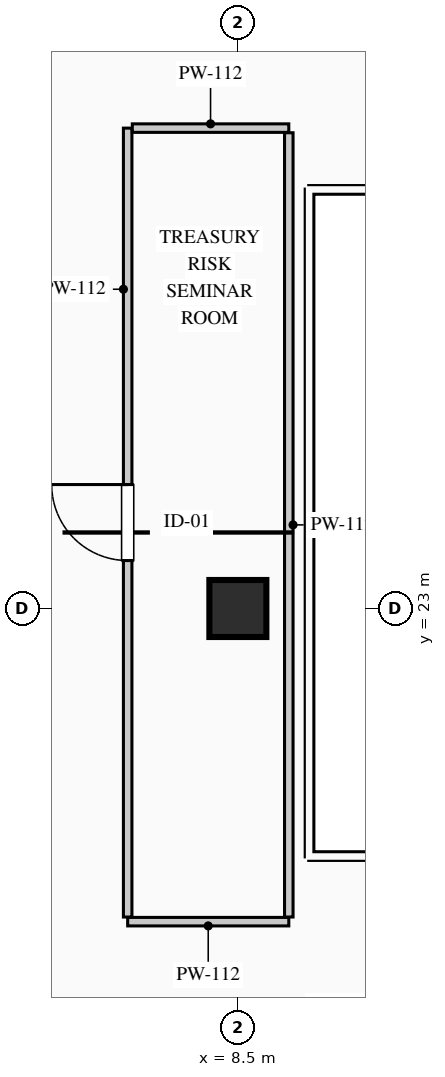
"""IFC4 building model, lengths in metres.
Left out: names, types, materials, properties, quantities, classifications, styles, units other than length and angle.
Written with IfcOpenShell. Run it as: python <this file> out.ifc"""

import sys

from ifc_helpers import new_model, si_unit, direction, frame, frame_2d, origin, origin_2d, place, context, subcontext, project, spatial, rectangle, extrude, element, fill, save


model = new_model("IFC4")
c1 = context("Model", 3, precision=1e-05, world=origin(), true_north=direction((0.0, 1.0)))
c2 = subcontext(c1, "Body", "Model", "MODEL_VIEW")
j1 = project(units=[si_unit("LENGTHUNIT", "METRE"), si_unit("PLANEANGLEUNIT", "RADIAN")], contexts=[c1])
p1 = place(None, origin())
s1 = spatial("IfcSite", under=j1, at=p1, CompositionType="ELEMENT")
p2 = place(p1, origin())
s2 = spatial("IfcBuilding", under=s1, at=p2, CompositionType="ELEMENT")
p3 = place(p2, frame((0.0, 0.0, 288.3)))
s3 = spatial("IfcBuildingStorey", under=s2, at=p3, CompositionType="ELEMENT", Elevation=288.3)
p4 = place(p3, frame((8.5, 23.0, 0.0), z_axis=(0.0, 0.0, 1.0), x_axis=(1.0, 0.0, 0.0)))
e1 = element("IfcColumn", 1, at=p4, inside=s3, PredefinedType="COLUMN", context=c2, shape_type="SweptSolid", body=[
    extrude(rectangle(XDim=0.75, YDim=0.75, at=origin_2d()), origin(), (0.0, 0.0, 1.0), 3.95),
])
p5 = place(p3, frame((9.17, 18.88, 0.0), z_axis=(0.0, 0.0, 1.0), x_axis=(-1.0, 0.0, 0.0)))
e2 = element("IfcWall", 2, at=p5, inside=s3, PredefinedType="PARTITIONING", context=c2, shape_type="SweptSolid", body=[
    extrude(rectangle(XDim=2.12, YDim=0.112, at=frame_2d((1.06, 0.0))), origin(), (0.0, 0.0, 1.0), 3.7),
])
p6 = place(p3, frame((7.05, 18.941, 0.0), z_axis=(0.0, 0.0, 1.0), x_axis=(0.0, 1.0, 0.0)))
e3 = element("IfcWall", 3, at=p6, inside=s3, PredefinedType="PARTITIONING", context=c2, shape_type="SweptSolid", body=[
    extrude(rectangle(XDim=10.379, YDim=0.112, at=frame_2d((5.189, 0.0))), origin(), (0.0, 0.0, 1.0), 3.7),
])
p7 = place(p6, frame((4.689, 0.0, 0.0)))
e4 = element("IfcOpeningElement", 4, at=p7, cuts=e3, PredefinedType="OPENING", context=c2, shape_type="SweptSolid", body=[
    extrude(rectangle(XDim=1.0, YDim=2.15, at=frame_2d((0.5, 1.075))), frame((0.0, 0.066, 0.0), z_axis=(0.0, -1.0, 0.0), x_axis=(1.0, 0.0, 0.0)), (0.0, 0.0, 1.0), 0.132),
])
p8 = place(p3, frame((7.111, 29.32, 0.0), z_axis=(0.0, 0.0, 1.0), x_axis=(1.0, 0.0, 0.0)))
e5 = element("IfcWall", 5, at=p8, inside=s3, PredefinedType="PARTITIONING", context=c2, shape_type="SweptSolid", body=[
    extrude(rectangle(XDim=2.059, YDim=0.112, at=frame_2d((1.029, 0.0))), origin(), (0.0, 0.0, 1.0), 3.7),
])
p9 = place(p3, frame((9.17, 29.259, 0.0), z_axis=(0.0, 0.0, 1.0), x_axis=(0.0, -1.0, 0.0)))
e6 = element("IfcWall", 6, at=p9, inside=s3, PredefinedType="PARTITIONING", context=c2, shape_type="SweptSolid", body=[
    extrude(rectangle(XDim=10.318, YDim=0.112, at=frame_2d((5.159, 0.0))), origin(), (0.0, 0.0, 1.0), 3.325),
])
p10 = place(p7, origin())
e7 = element("IfcDoor", 7, at=p10, inside=s3, OperationType="SINGLE_SWING_RIGHT", PredefinedType="DOOR", context=c2, shape_type="SweptSolid", body=[
    extrude(rectangle(XDim=1.0, YDim=2.15, at=frame_2d((0.5, 1.075))), frame((0.0, 0.025, 0.0), z_axis=(0.0, -1.0, 0.0), x_axis=(1.0, 0.0, 0.0)), (0.0, 0.0, 1.0), 0.05),
])
fill(e4, e7)
save(model, sys.argv[1])
